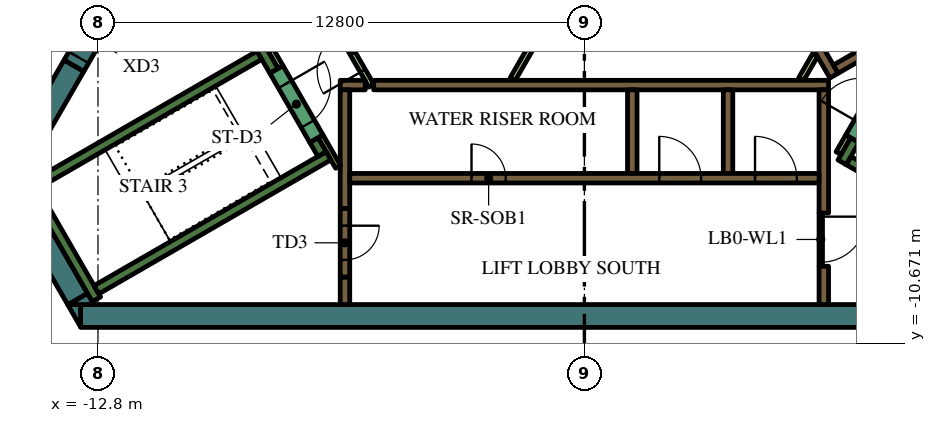
"""IFC4 building model, lengths in metres.
Left out: names, types, materials, properties, quantities, classifications, styles, units other than length and angle.
Written with IfcOpenShell. Run it as: python <this file> out.ifc"""

import sys

from ifc_helpers import new_model, si_unit, direction, frame, frame_2d, origin, place, context, subcontext, project, spatial, polyline, rectangle, outline, extrude, element, fill, save


model = new_model("IFC4")
c1 = context("Model", 3, precision=1e-05, world=origin(), true_north=direction((0.0, 1.0)))
c2 = subcontext(c1, "Body", "Model", "MODEL_VIEW")
j1 = project(units=[si_unit("LENGTHUNIT", "METRE"), si_unit("PLANEANGLEUNIT", "RADIAN")], contexts=[c1])
p1 = place(None, origin())
s1 = spatial("IfcSite", under=j1, at=p1, CompositionType="ELEMENT")
p2 = place(p1, origin())
s2 = spatial("IfcBuilding", under=s1, at=p2, CompositionType="ELEMENT")
p3 = place(p2, frame((0.0, 0.0, 309.0)))
s3 = spatial("IfcBuildingStorey", under=s2, at=p3, CompositionType="ELEMENT", Elevation=309.0)
p4 = place(p3, frame((8.904, -9.95, 0.0), z_axis=(0.0, 0.0, 1.0), x_axis=(-1.0, 0.0, 0.0)))
e1 = element("IfcWall", 1, at=p4, inside=s3, PredefinedType="SOLIDWALL", context=c2, shape_type="SweptSolid", body=[
    extrude(rectangle(XDim=22.161, YDim=0.6, at=frame_2d((11.081, 0.0))), origin(), (0.0, 0.0, 1.0), 4.2),
])
p5 = place(p3, origin())
e2 = element("IfcWall", 2, at=p5, inside=s3, PredefinedType="SOLIDWALL", context=c2, shape_type="SweptSolid", body=[
    extrude(outline(polyline([(-13.597, -9.65), (-13.259, -9.65), (-13.259, -10.236), (-13.597, -9.65)])), origin(), (0.0, 0.0, 1.0), 4.2),
])
p6 = place(p3, frame((-13.333, -9.506, 0.0), z_axis=(0.0, 0.0, 1.0), x_axis=(-0.500019073792, 0.866014391245, 0.0)))
e3 = element("IfcWall", 3, at=p6, inside=s3, PredefinedType="SOLIDWALL", context=c2, shape_type="SweptSolid", body=[
    extrude(rectangle(XDim=3.823, YDim=0.6, at=frame_2d((1.912, 0.0))), origin(), (0.0, 0.0, 1.0), 4.2),
])
e4 = element("IfcWall", 4, at=p5, inside=s3, PredefinedType="SOLIDWALL", context=c2, shape_type="SweptSolid", body=[
    extrude(outline(polyline([(-12.904, -9.65), (-13.58, -9.65), (-13.073, -9.357), (-12.904, -9.65)])), origin(), (0.0, 0.0, 1.0), 4.2),
])
p7 = place(p3, frame((-13.432, -3.364, 0.0), z_axis=(0.0, 0.0, 1.0), x_axis=(-0.499960127962, -0.866048422692, 0.0)))
e5 = element("IfcWall", 5, at=p7, inside=s3, PredefinedType="SOLIDWALL", context=c2, shape_type="SweptSolid", body=[
    extrude(rectangle(XDim=2.934, YDim=0.6, at=frame_2d((1.467, 0.0))), origin(), (0.0, 0.0, 1.0), 4.2),
])
p8 = place(p3, frame((12.84, -9.261, 0.0), z_axis=(0.0, 0.0, 1.0), x_axis=(-0.866013990052, 0.500019768644, 0.0)))
e6 = element("IfcWall", 6, at=p8, inside=s3, PredefinedType="SOLIDWALL", context=c2, shape_type="SweptSolid", body=[
    extrude(rectangle(XDim=6.8, YDim=0.25, at=frame_2d((3.4, 0.0))), origin(), (0.0, 0.0, 1.0), 4.2),
])
p9 = place(p3, frame((6.78, -5.906, 0.0), z_axis=(0.0, 0.0, 1.0), x_axis=(0.500223362819, 0.865896406789, 0.0)))
e7 = element("IfcWall", 7, at=p9, inside=s3, PredefinedType="SOLIDWALL", context=c2, shape_type="SweptSolid", body=[
    extrude(rectangle(XDim=0.675, YDim=0.25, at=frame_2d((0.337, 0.0))), origin(), (0.0, 0.0, 1.0), 4.2),
])
p10 = place(p3, frame((-12.84, -9.511, 0.0), z_axis=(0.0, 0.0, 1.0), x_axis=(-0.499997733992, 0.866026712061, 0.0)))
e8 = element("IfcWall", 8, at=p10, inside=s3, PredefinedType="SOLIDWALL", context=c2, shape_type="SweptSolid", body=[
    extrude(rectangle(XDim=3.634, YDim=0.25, at=frame_2d((1.817, 0.0))), origin(), (0.0, 0.0, 1.0), 4.2),
])
p11 = place(p3, frame((-14.44, -6.49, 0.0), z_axis=(0.0, 0.0, 1.0), x_axis=(0.866022966069, 0.500004222222, 0.0)))
e9 = element("IfcWall", 9, at=p11, inside=s3, PredefinedType="SOLIDWALL", context=c2, shape_type="SweptSolid", body=[
    extrude(rectangle(XDim=6.8, YDim=0.25, at=frame_2d((3.4, 0.0))), origin(), (0.0, 0.0, 1.0), 4.2),
])
p12 = place(p3, frame((-8.168, -3.503, 0.0), z_axis=(0.0, 0.0, 1.0), x_axis=(-0.499952099219, 0.866053057547, 0.0)))
e10 = element("IfcWall", 10, at=p12, inside=s3, PredefinedType="SOLIDWALL", context=c2, shape_type="SweptSolid", body=[
    extrude(rectangle(XDim=0.675, YDim=0.25, at=frame_2d((0.337, 0.0))), origin(), (0.0, 0.0, 1.0), 4.2),
])
p13 = place(p3, frame((-12.84, -9.261, 0.0), z_axis=(0.0, 0.0, 1.0), x_axis=(0.866016039709, 0.500016218704, 0.0)))
e11 = element("IfcWall", 11, at=p13, inside=s3, PredefinedType="SOLIDWALL", context=c2, shape_type="SweptSolid", body=[
    extrude(rectangle(XDim=7.05, YDim=0.25, at=frame_2d((3.525, 0.0))), origin(), (0.0, 0.0, 1.0), 4.2),
])
p14 = place(p3, frame((-6.905, -5.69, 0.0), z_axis=(0.0, 0.0, 1.0), x_axis=(-0.500402024738, 0.865793170242, 0.0)))
e12 = element("IfcWall", 12, at=p14, inside=s3, PredefinedType="SOLIDWALL", context=c2, shape_type="SweptSolid", body=[
    extrude(rectangle(XDim=0.425, YDim=0.25, at=frame_2d((0.212, 0.0))), origin(), (0.0, 0.0, 1.0), 4.2),
])
p15 = place(p3, frame((-5.545, -3.875, 0.0), z_axis=(0.0, 0.0, 1.0), x_axis=(1.0, 0.0, 0.0)))
e13 = element("IfcWall", 13, at=p15, inside=s3, PredefinedType="SOLIDWALL", context=c2, shape_type="SweptSolid", body=[
    extrude(rectangle(XDim=11.97, YDim=0.25, at=frame_2d((5.985, 0.0))), origin(), (0.0, 0.0, 1.0), 4.2),
])
p16 = place(p3, frame((-6.425, -3.875, 0.0), z_axis=(0.0, 0.0, 1.0), x_axis=(1.0, 0.0, 0.0)))
e14 = element("IfcWall", 14, at=p16, inside=s3, PredefinedType="SOLIDWALL", context=c2, shape_type="SweptSolid", body=[
    extrude(rectangle(XDim=0.658, YDim=0.25, at=frame_2d((0.329, 0.0))), origin(), (0.0, 0.0, 1.0), 4.2),
])
p17 = place(p3, frame((6.3, -7.24, 0.0), z_axis=(0.0, 0.0, 1.0), x_axis=(0.0, 1.0, 0.0)))
e15 = element("IfcWall", 15, at=p17, inside=s3, PredefinedType="SOLIDWALL", context=c2, shape_type="SweptSolid", body=[
    extrude(rectangle(XDim=3.24, YDim=0.25, at=frame_2d((1.62, 0.0))), origin(), (0.0, 0.0, 1.0), 4.2),
])
p18 = place(p3, frame((6.3, -9.65, 0.0), z_axis=(0.0, 0.0, 1.0), x_axis=(0.0, 1.0, 0.0)))
e16 = element("IfcWall", 16, at=p18, inside=s3, PredefinedType="SOLIDWALL", context=c2, shape_type="SweptSolid", body=[
    extrude(rectangle(XDim=1.008, YDim=0.25, at=frame_2d((0.504, 0.0))), origin(), (0.0, 0.0, 1.0), 4.2),
])
for number, where, z_axis, x_axis in (
    (17, (3.78, -4.0, 0.0), (0.0, 0.0, 1.0), (0.0, -1.0, 0.0)),
    (18, (1.26, -4.0, 0.0), (0.0, 0.0, 1.0), (0.0, -1.0, 0.0)),
):
    element("IfcWall", number, at=place(p3, frame(where, z_axis=z_axis, x_axis=x_axis)), inside=s3, PredefinedType="SOLIDWALL", context=c2, shape_type="SweptSolid", body=[
        extrude(rectangle(XDim=2.2, YDim=0.25, at=frame_2d((1.1, 0.0))), origin(), (0.0, 0.0, 1.0), 4.2),
    ])
p19 = place(p3, frame((-6.3, -7.125, 0.0), z_axis=(0.0, 0.0, 1.0), x_axis=(0.0, 1.0, 0.0)))
e19 = element("IfcWall", 19, at=p19, inside=s3, PredefinedType="SOLIDWALL", context=c2, shape_type="SweptSolid", body=[
    extrude(rectangle(XDim=3.125, YDim=0.25, at=frame_2d((1.562, 0.0))), origin(), (0.0, 0.0, 1.0), 4.2),
])
p20 = place(p3, frame((-6.3, -8.925, 0.0), z_axis=(0.0, 0.0, 1.0), x_axis=(0.0, -1.0, 0.0)))
e20 = element("IfcWall", 20, at=p20, inside=s3, PredefinedType="SOLIDWALL", context=c2, shape_type="SweptSolid", body=[
    extrude(rectangle(XDim=0.725, YDim=0.25, at=frame_2d((0.363, 0.0))), origin(), (0.0, 0.0, 1.0), 4.2),
])
p21 = place(p3, frame((6.568, -3.627, 0.0), z_axis=(0.0, 0.0, 1.0), x_axis=(-0.499999455981, 0.866025717874, 0.0)))
e21 = element("IfcWall", 21, at=p21, inside=s3, PredefinedType="SOLIDWALL", context=c2, shape_type="SweptSolid", body=[
    extrude(rectangle(XDim=11.978, YDim=0.25, at=frame_2d((5.989, 0.0))), origin(), (0.0, 0.0, 1.0), 4.2),
])
p22 = place(p3, frame((6.614, -3.456, 0.0), z_axis=(0.0, 0.0, 1.0), x_axis=(0.866032512851, 0.499987686533, 0.0)))
e22 = element("IfcWall", 22, at=p22, inside=s3, PredefinedType="SOLIDWALL", context=c2, shape_type="SweptSolid", body=[
    extrude(rectangle(XDim=2.975, YDim=0.25, at=frame_2d((1.487, 0.0))), origin(), (0.0, 0.0, 1.0), 4.2),
])
p23 = place(p3, frame((-8.252, -2.958, 0.0), z_axis=(0.0, 0.0, 1.0), x_axis=(0.500174715838, -0.865924508047, 0.0)))
e23 = element("IfcWall", 23, at=p23, inside=s3, PredefinedType="PARTITIONING", context=c2, shape_type="SweptSolid", body=[
    extrude(rectangle(XDim=0.514, YDim=0.15, at=frame_2d((0.257, 0.0))), origin(), (0.0, 0.0, 1.0), 3.55),
])
p24 = place(p3, frame((-6.48, -6.027, 0.0), z_axis=(0.0, 0.0, 1.0), x_axis=(-0.499927229454, 0.866067413802, 0.0)))
e24 = element("IfcWall", 24, at=p24, inside=s3, PredefinedType="PARTITIONING", context=c2, shape_type="SweptSolid", body=[
    extrude(rectangle(XDim=0.929, YDim=0.15, at=frame_2d((0.464, 0.0))), origin(), (0.0, 0.0, 1.0), 4.2),
])
p25 = place(p3, frame((6.945, -5.222, 0.0), z_axis=(0.0, 0.0, 1.0), x_axis=(-0.499818422106, -0.866130212453, 0.0)))
e25 = element("IfcWall", 25, at=p25, inside=s3, PredefinedType="PARTITIONING", context=c2, shape_type="SweptSolid", body=[
    extrude(rectangle(XDim=0.514, YDim=0.15, at=frame_2d((0.257, 0.0))), origin(), (0.0, 0.0, 1.0), 3.55),
])
p26 = place(p3, frame((5.705, -3.718, 0.0), z_axis=(0.0, 0.0, 1.0), x_axis=(0.499962090823, 0.866047289552, 0.0)))
e26 = element("IfcWall", 26, at=p26, inside=s3, PredefinedType="PARTITIONING", context=c2, shape_type="SweptSolid", body=[
    extrude(rectangle(XDim=0.735, YDim=0.15, at=frame_2d((0.367, 0.0))), origin(), (0.0, 0.0, 1.0), 3.55),
])
p27 = place(p3, frame((-1.887, -3.718, 0.0), z_axis=(0.0, 0.0, 1.0), x_axis=(0.500043732237, 0.866000153493, 0.0)))
e27 = element("IfcWall", 27, at=p27, inside=s3, PredefinedType="PARTITIONING", context=c2, shape_type="SweptSolid", body=[
    extrude(rectangle(XDim=3.114, YDim=0.15, at=frame_2d((1.557, 0.0))), origin(), (0.0, 0.0, 1.0), 3.55),
])
p28 = place(p3, frame((-6.175, -6.325, 0.0), z_axis=(0.0, 0.0, 1.0), x_axis=(1.0, 0.0, 0.0)))
e28 = element("IfcWall", 28, at=p28, inside=s3, PredefinedType="SOLIDWALL", context=c2, shape_type="SweptSolid", body=[
    extrude(rectangle(XDim=12.35, YDim=0.25, at=frame_2d((6.175, 0.0))), origin(), (0.0, 0.0, 1.0), 4.2),
])
p29 = place(p28, frame((3.205, 0.0, 0.0)))
e29 = element("IfcOpeningElement", 29, at=p29, cuts=e28, PredefinedType="OPENING", context=c2, shape_type="SweptSolid", body=[
    extrude(rectangle(XDim=0.9, YDim=2.1, at=frame_2d((0.45, 1.05))), frame((0.0, 0.135, 0.0), z_axis=(0.0, -1.0, 0.0), x_axis=(1.0, 0.0, 0.0)), (0.0, 0.0, 1.0), 0.27),
])
p30 = place(p28, frame((8.145, 0.0, 0.0)))
e30 = element("IfcOpeningElement", 30, at=p30, cuts=e28, PredefinedType="OPENING", context=c2, shape_type="SweptSolid", body=[
    extrude(rectangle(XDim=1.1, YDim=2.1, at=frame_2d((0.55, 1.05))), frame((0.0, 0.135, 0.0), z_axis=(0.0, -1.0, 0.0), x_axis=(1.0, 0.0, 0.0)), (0.0, 0.0, 1.0), 0.27),
])
p31 = place(p28, frame((10.665, 0.0, 0.0)))
e31 = element("IfcOpeningElement", 31, at=p31, cuts=e28, PredefinedType="OPENING", context=c2, shape_type="SweptSolid", body=[
    extrude(rectangle(XDim=1.1, YDim=2.1, at=frame_2d((0.55, 1.05))), frame((0.0, 0.135, 0.0), z_axis=(0.0, -1.0, 0.0), x_axis=(1.0, 0.0, 0.0)), (0.0, 0.0, 1.0), 0.27),
])
p32 = place(p3, frame((7.053, -5.284, 0.0), z_axis=(0.0, 0.0, 1.0), x_axis=(0.500078061341, 0.865980330357, 0.0)))
e32 = element("IfcWall", 32, at=p32, inside=s3, PredefinedType="SOLIDWALL", context=c2, shape_type="SweptSolid", body=[
    extrude(rectangle(XDim=2.1, YDim=0.4, at=frame_2d((1.05, 0.0))), origin(), (0.0, 0.0, 1.0), 4.2),
])
p33 = place(p32, frame((0.45, 0.0, 0.0)))
e33 = element("IfcOpeningElement", 33, at=p33, cuts=e32, PredefinedType="OPENING", context=c2, shape_type="SweptSolid", body=[
    extrude(rectangle(XDim=1.2, YDim=2.1, at=frame_2d((0.6, 1.05))), frame((0.0, 0.21, 0.0), z_axis=(0.0, -1.0, 0.0), x_axis=(1.0, 0.0, 0.0)), (0.0, 0.0, 1.0), 0.42),
])
p34 = place(p3, frame((-8.103, -3.466, 0.0), z_axis=(0.0, 0.0, 1.0), x_axis=(0.500078061341, -0.865980330357, 0.0)))
e34 = element("IfcWall", 34, at=p34, inside=s3, PredefinedType="SOLIDWALL", context=c2, shape_type="SweptSolid", body=[
    extrude(rectangle(XDim=2.1, YDim=0.4, at=frame_2d((1.05, 0.0))), origin(), (0.0, 0.0, 1.0), 4.2),
])
p35 = place(p34, frame((0.45, 0.0, 0.0)))
e35 = element("IfcOpeningElement", 35, at=p35, cuts=e34, PredefinedType="OPENING", context=c2, shape_type="SweptSolid", body=[
    extrude(rectangle(XDim=1.2, YDim=2.1, at=frame_2d((0.6, 1.05))), frame((0.0, 0.21, 0.0), z_axis=(0.0, -1.0, 0.0), x_axis=(1.0, 0.0, 0.0)), (0.0, 0.0, 1.0), 0.42),
])
p36 = place(p3, frame((-6.3, -7.125, 0.0), z_axis=(0.0, 0.0, 1.0), x_axis=(0.0, -1.0, 0.0)))
e36 = element("IfcWall", 36, at=p36, inside=s3, PredefinedType="SOLIDWALL", context=c2, shape_type="SweptSolid", body=[
    extrude(rectangle(XDim=1.8, YDim=0.25, at=frame_2d((0.9, 0.0))), origin(), (0.0, 0.0, 1.0), 4.2),
])
p37 = place(p36, frame((0.45, 0.0, 0.0)))
e37 = element("IfcOpeningElement", 37, at=p37, cuts=e36, PredefinedType="OPENING", context=c2, shape_type="SweptSolid", body=[
    extrude(rectangle(XDim=0.9, YDim=2.1, at=frame_2d((0.45, 1.05))), frame((0.0, 0.135, 0.0), z_axis=(0.0, -1.0, 0.0), x_axis=(1.0, 0.0, 0.0)), (0.0, 0.0, 1.0), 0.27),
])
p38 = place(p3, frame((-5.606, -3.89, 0.0), z_axis=(0.0, 0.0, 1.0), x_axis=(-0.500027713859, 0.866009402589, 0.0)))
e38 = element("IfcWall", 38, at=p38, inside=s3, PredefinedType="PARTITIONING", context=c2, shape_type="SweptSolid", body=[
    extrude(rectangle(XDim=2.1, YDim=0.15, at=frame_2d((1.05, 0.0))), origin(), (0.0, 0.0, 1.0), 3.55),
])
p39 = place(p38, frame((0.45, 0.0, 0.0)))
e39 = element("IfcOpeningElement", 39, at=p39, cuts=e38, PredefinedType="OPENING", context=c2, shape_type="SweptSolid", body=[
    extrude(rectangle(XDim=1.2, YDim=2.1, at=frame_2d((0.6, 1.05))), frame((0.0, 0.085, 0.0), z_axis=(0.0, -1.0, 0.0), x_axis=(1.0, 0.0, 0.0)), (0.0, 0.0, 1.0), 0.17),
])
p40 = place(p3, frame((6.22, -7.237, 0.0), z_axis=(0.0, 0.0, 1.0), x_axis=(0.0, -1.0, 0.0)))
e40 = element("IfcWall", 40, at=p40, inside=s3, PredefinedType="PARTITIONING", context=c2, shape_type="SweptSolid", body=[
    extrude(rectangle(XDim=1.4, YDim=0.09, at=frame_2d((0.7, 0.0))), origin(), (0.0, 0.0, 1.0), 3.55),
])
p41 = place(p40, frame((0.1, 0.0, 0.0)))
e41 = element("IfcOpeningElement", 41, at=p41, cuts=e40, PredefinedType="OPENING", context=c2, shape_type="SweptSolid", body=[
    extrude(rectangle(XDim=1.2, YDim=2.1, at=frame_2d((0.6, 1.05))), frame((0.0, 0.055, 0.0), z_axis=(0.0, -1.0, 0.0), x_axis=(1.0, 0.0, 0.0)), (0.0, 0.0, 1.0), 0.11),
])
p42 = place(p3, frame((-13.432, -3.364, 0.0), z_axis=(0.0, 0.0, 1.0), x_axis=(0.500062241894, 0.865989465428, 0.0)))
e42 = element("IfcWall", 42, at=p42, inside=s3, PredefinedType="SOLIDWALL", context=c2, shape_type="SweptSolid", body=[
    extrude(rectangle(XDim=1.7, YDim=0.6, at=frame_2d((0.85, 0.0))), origin(), (0.0, 0.0, 1.0), 4.2),
])
p43 = place(p42, frame((0.25, 0.0, 0.0)))
e43 = element("IfcOpeningElement", 43, at=p43, cuts=e42, PredefinedType="OPENING", context=c2, shape_type="SweptSolid", body=[
    extrude(rectangle(XDim=1.2, YDim=2.1, at=frame_2d((0.6, 1.05))), frame((0.0, 0.31, 0.0), z_axis=(0.0, -1.0, 0.0), x_axis=(1.0, 0.0, 0.0)), (0.0, 0.0, 1.0), 0.62),
])
p44 = place(p29, origin())
e44 = element("IfcDoor", 44, at=p44, inside=s3, OperationType="SINGLE_SWING_LEFT", PredefinedType="DOOR", context=c2, shape_type="SweptSolid", body=[
    extrude(rectangle(XDim=0.9, YDim=2.1, at=frame_2d((0.45, 1.05))), frame((0.0, 0.025, 0.0), z_axis=(0.0, -1.0, 0.0), x_axis=(1.0, 0.0, 0.0)), (0.0, 0.0, 1.0), 0.05),
])
fill(e29, e44)
p45 = place(p30, origin())
e45 = element("IfcDoor", 45, at=p45, inside=s3, OperationType="DOUBLE_DOOR_SLIDING", PredefinedType="DOOR", context=c2, shape_type="SweptSolid", body=[
    extrude(rectangle(XDim=1.1, YDim=2.1, at=frame_2d((0.55, 1.05))), frame((0.0, 0.025, 0.0), z_axis=(0.0, -1.0, 0.0), x_axis=(1.0, 0.0, 0.0)), (0.0, 0.0, 1.0), 0.05),
])
fill(e30, e45)
p46 = place(p31, origin())
e46 = element("IfcDoor", 46, at=p46, inside=s3, OperationType="DOUBLE_DOOR_SLIDING", PredefinedType="DOOR", context=c2, shape_type="SweptSolid", body=[
    extrude(rectangle(XDim=1.1, YDim=2.1, at=frame_2d((0.55, 1.05))), frame((0.0, 0.025, 0.0), z_axis=(0.0, -1.0, 0.0), x_axis=(1.0, 0.0, 0.0)), (0.0, 0.0, 1.0), 0.05),
])
fill(e31, e46)
p47 = place(p35, origin())
e47 = element("IfcDoor", 47, at=p47, inside=s3, OperationType="SINGLE_SWING_LEFT", PredefinedType="DOOR", context=c2, shape_type="SweptSolid", body=[
    extrude(rectangle(XDim=1.2, YDim=2.1, at=frame_2d((0.6, 1.05))), frame((0.0, 0.025, 0.0), z_axis=(0.0, -1.0, 0.0), x_axis=(1.0, 0.0, 0.0)), (0.0, 0.0, 1.0), 0.05),
])
fill(e35, e47)
p48 = place(p37, origin())
e48 = element("IfcDoor", 48, at=p48, inside=s3, OperationType="SINGLE_SWING_LEFT", PredefinedType="DOOR", context=c2, shape_type="SweptSolid", body=[
    extrude(rectangle(XDim=0.9, YDim=2.1, at=frame_2d((0.45, 1.05))), frame((0.0, 0.025, 0.0), z_axis=(0.0, -1.0, 0.0), x_axis=(1.0, 0.0, 0.0)), (0.0, 0.0, 1.0), 0.05),
])
fill(e37, e48)
p49 = place(p39, origin())
e49 = element("IfcDoor", 49, at=p49, inside=s3, OperationType="SINGLE_SWING_LEFT", PredefinedType="DOOR", context=c2, shape_type="SweptSolid", body=[
    extrude(rectangle(XDim=1.2, YDim=2.1, at=frame_2d((0.6, 1.05))), frame((0.0, 0.025, 0.0), z_axis=(0.0, -1.0, 0.0), x_axis=(1.0, 0.0, 0.0)), (0.0, 0.0, 1.0), 0.05),
])
fill(e39, e49)
p50 = place(p41, origin())
e50 = element("IfcDoor", 50, at=p50, inside=s3, OperationType="SINGLE_SWING_LEFT", PredefinedType="DOOR", context=c2, shape_type="SweptSolid", body=[
    extrude(rectangle(XDim=1.2, YDim=2.1, at=frame_2d((0.6, 1.05))), frame((0.0, 0.025, 0.0), z_axis=(0.0, -1.0, 0.0), x_axis=(1.0, 0.0, 0.0)), (0.0, 0.0, 1.0), 0.05),
])
fill(e41, e50)
p51 = place(p43, origin())
e51 = element("IfcDoor", 51, at=p51, inside=s3, OperationType="SINGLE_SWING_LEFT", PredefinedType="DOOR", context=c2, shape_type="SweptSolid", body=[
    extrude(rectangle(XDim=1.2, YDim=2.1, at=frame_2d((0.6, 1.05))), frame((0.0, 0.025, 0.0), z_axis=(0.0, -1.0, 0.0), x_axis=(1.0, 0.0, 0.0)), (0.0, 0.0, 1.0), 0.05),
])
fill(e43, e51)
save(model, sys.argv[1])
